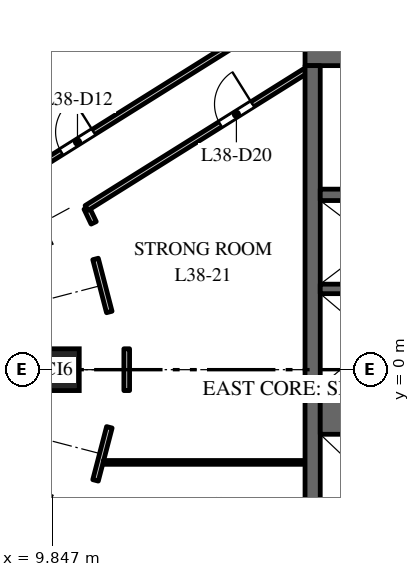
"""IFC4 building model, lengths in metres.
Left out: names, types, materials, properties, quantities, classifications, styles, units other than length and angle.
Written with IfcOpenShell. Run it as: python <this file> out.ifc"""

import sys

from ifc_helpers import new_model, si_unit, direction, frame, frame_2d, origin, origin_2d, place, context, subcontext, project, spatial, rectangle, extrude, element, fill, save


model = new_model("IFC4")
c1 = context("Model", 3, precision=1e-05, world=origin(), true_north=direction((0.0, 1.0)))
c2 = subcontext(c1, "Body", "Model", "MODEL_VIEW")
j1 = project(units=[si_unit("LENGTHUNIT", "METRE"), si_unit("PLANEANGLEUNIT", "RADIAN")], contexts=[c1])
p1 = place(None, origin())
s1 = spatial("IfcSite", under=j1, at=p1, CompositionType="ELEMENT")
p2 = place(p1, origin())
s2 = spatial("IfcBuilding", under=s1, at=p2, CompositionType="ELEMENT")
p3 = place(p2, frame((0.0, 0.0, 166.0)))
s3 = spatial("IfcBuildingStorey", under=s2, at=p3, CompositionType="ELEMENT", Elevation=166.0)
p4 = place(p3, frame((10.008, 0.0, 0.0), z_axis=(0.0, 0.0, 1.0), x_axis=(0.0, 1.0, 0.0)))
e1 = element("IfcColumn", 1, at=p4, inside=s3, PredefinedType="COLUMN", context=c2, shape_type="SweptSolid", body=[
    extrude(rectangle(XDim=1.1, YDim=1.1, at=origin_2d()), origin(), (0.0, 0.0, 1.0), 4.0),
])
p5 = place(p3, frame((16.5, 8.25, 0.0), z_axis=(0.0, 0.0, 1.0), x_axis=(1.0, 0.0, 0.0)))
e2 = element("IfcWall", 2, at=p5, inside=s3, PredefinedType="SHEAR", context=c2, shape_type="SweptSolid", body=[
    extrude(rectangle(XDim=15.0, YDim=0.5, at=frame_2d((7.5, 0.0))), origin(), (0.0, 0.0, 1.0), 3.7),
])
p6 = place(p5, frame((6.9, 0.0, 0.0)))
e3 = element("IfcOpeningElement", 3, at=p6, cuts=e2, PredefinedType="OPENING", context=c2, shape_type="SweptSolid", body=[
    extrude(rectangle(XDim=1.2, YDim=2.1, at=frame_2d((0.6, 1.05))), frame((0.0, 0.26, 0.0), z_axis=(0.0, -1.0, 0.0), x_axis=(1.0, 0.0, 0.0)), (0.0, 0.0, 1.0), 0.52),
])
p7 = place(p5, frame((12.275, 0.0, 0.0)))
e4 = element("IfcOpeningElement", 4, at=p7, cuts=e2, PredefinedType="OPENING", context=c2, shape_type="SweptSolid", body=[
    extrude(rectangle(XDim=0.9, YDim=2.1, at=frame_2d((0.45, 1.05))), frame((0.0, 0.26, 0.0), z_axis=(0.0, -1.0, 0.0), x_axis=(1.0, 0.0, 0.0)), (0.0, 0.0, 1.0), 0.52),
])
p8 = place(p3, frame((16.7, -8.0, 0.0), z_axis=(0.0, 0.0, 1.0), x_axis=(0.0, 1.0, 0.0)))
e5 = element("IfcWall", 5, at=p8, inside=s3, PredefinedType="SHEAR", context=c2, shape_type="SweptSolid", body=[
    extrude(rectangle(XDim=16.0, YDim=0.4, at=frame_2d((8.0, 0.0))), origin(), (0.0, 0.0, 1.0), 3.7),
])
p9 = place(p3, frame((16.9, -1.075, 0.0), z_axis=(0.0, 0.0, 1.0), x_axis=(1.0, 0.0, 0.0)))
e6 = element("IfcWall", 6, at=p9, inside=s3, PredefinedType="SHEAR", context=c2, shape_type="SweptSolid", body=[
    extrude(rectangle(XDim=2.9, YDim=1.25, at=frame_2d((1.45, 0.0))), origin(), (0.0, 0.0, 1.0), 3.7),
])
p10 = place(p3, frame((16.9, 2.125, 0.0), z_axis=(0.0, 0.0, 1.0), x_axis=(1.0, 0.0, 0.0)))
e7 = element("IfcWall", 7, at=p10, inside=s3, PredefinedType="SHEAR", context=c2, shape_type="SweptSolid", body=[
    extrude(rectangle(XDim=2.9, YDim=0.25, at=frame_2d((1.45, 0.0))), origin(), (0.0, 0.0, 1.0), 3.7),
])
p11 = place(p3, frame((16.9, 4.6, 0.0), z_axis=(0.0, 0.0, 1.0), x_axis=(1.0, 0.0, 0.0)))
e8 = element("IfcWall", 8, at=p11, inside=s3, PredefinedType="SHEAR", context=c2, shape_type="SweptSolid", body=[
    extrude(rectangle(XDim=6.18, YDim=0.3, at=frame_2d((3.09, 0.0))), origin(), (0.0, 0.0, 1.0), 3.7),
])
p12 = place(p11, frame((4.9, 0.0, 0.0)))
e9 = element("IfcOpeningElement", 9, at=p12, cuts=e8, PredefinedType="OPENING", context=c2, shape_type="SweptSolid", body=[
    extrude(rectangle(XDim=1.1, YDim=2.1, at=frame_2d((0.55, 1.05))), frame((0.0, 0.16, 0.0), z_axis=(0.0, -1.0, 0.0), x_axis=(1.0, 0.0, 0.0)), (0.0, 0.0, 1.0), 0.32),
])
p13 = place(p3, frame((9.679, 5.469, 0.0), z_axis=(0.0, 0.0, 1.0), x_axis=(0.847602682855, 0.530631408811, 0.0)))
e10 = element("IfcWall", 10, at=p13, inside=s3, PredefinedType="PARTITIONING", context=c2, shape_type="SweptSolid", body=[
    extrude(rectangle(XDim=6.383, YDim=0.15, at=frame_2d((3.191, 0.0))), origin(), (0.0, 0.0, 1.0), 3.7),
])
p14 = place(p13, frame((0.483, 0.0, 0.0)))
e11 = element("IfcOpeningElement", 11, at=p14, cuts=e10, PredefinedType="OPENING", context=c2, shape_type="SweptSolid", body=[
    extrude(rectangle(XDim=1.0, YDim=2.1, at=frame_2d((0.5, 1.05))), frame((0.0, 0.085, 0.0), z_axis=(0.0, -1.0, 0.0), x_axis=(1.0, 0.0, 0.0)), (0.0, 0.0, 1.0), 0.17),
])
p15 = place(p3, frame((10.752, 4.254, 0.0), z_axis=(0.0, 0.0, 1.0), x_axis=(0.429758433873, -0.90294390109, 0.0)))
e12 = element("IfcWall", 12, at=p15, inside=s3, PredefinedType="PARTITIONING", context=c2, shape_type="SweptSolid", body=[
    extrude(rectangle(XDim=0.433, YDim=0.15, at=frame_2d((0.216, 0.0))), origin(), (0.0, 0.0, 1.0), 3.7),
])
p16 = place(p3, frame((10.752, 4.254, 0.0), z_axis=(0.0, 0.0, 1.0), x_axis=(0.847690706888, 0.530490777917, 0.0)))
e13 = element("IfcWall", 13, at=p16, inside=s3, PredefinedType="PARTITIONING", context=c2, shape_type="SweptSolid", body=[
    extrude(rectangle(XDim=6.781, YDim=0.15, at=frame_2d((3.39, 0.0))), origin(), (0.0, 0.0, 1.0), 3.7),
])
p17 = place(p16, frame((4.15, 0.0, 0.0)))
e14 = element("IfcOpeningElement", 14, at=p17, cuts=e13, PredefinedType="OPENING", context=c2, shape_type="SweptSolid", body=[
    extrude(rectangle(XDim=1.0, YDim=2.1, at=frame_2d((0.5, 1.05))), frame((0.0, 0.085, 0.0), z_axis=(0.0, -1.0, 0.0), x_axis=(1.0, 0.0, 0.0)), (0.0, 0.0, 1.0), 0.17),
])
p18 = place(p3, frame((10.987, -2.913, 0.0), z_axis=(0.0, 0.0, 1.0), x_axis=(0.252153395539, 0.967687276509, 0.0)))
e15 = element("IfcWall", 15, at=p18, inside=s3, PredefinedType="PARTITIONING", context=c2, shape_type="SweptSolid", body=[
    extrude(rectangle(XDim=1.444, YDim=0.15, at=frame_2d((0.722, 0.0))), origin(), (0.0, 0.0, 1.0), 3.7),
])
p19 = place(p3, frame((10.987, 2.913, 0.0), z_axis=(0.0, 0.0, 1.0), x_axis=(0.251214938505, -0.967931327457, 0.0)))
e16 = element("IfcWall", 16, at=p19, inside=s3, PredefinedType="PARTITIONING", context=c2, shape_type="SweptSolid", body=[
    extrude(rectangle(XDim=1.441, YDim=0.15, at=frame_2d((0.721, 0.0))), origin(), (0.0, 0.0, 1.0), 3.7),
])
p20 = place(p3, frame((11.193, -2.44, 0.0), z_axis=(0.0, 0.0, 1.0), x_axis=(1.0, 0.0, 0.0)))
e17 = element("IfcWall", 17, at=p20, inside=s3, PredefinedType="PARTITIONING", context=c2, shape_type="SweptSolid", body=[
    extrude(rectangle(XDim=5.307, YDim=0.1, at=frame_2d((2.653, 0.0))), origin(), (0.0, 0.0, 1.0), 3.7),
])
p21 = place(p3, frame((11.808, -0.55, 0.0), z_axis=(0.0, 0.0, 1.0), x_axis=(0.0, 1.0, 0.0)))
e18 = element("IfcWall", 18, at=p21, inside=s3, PredefinedType="PARTITIONING", context=c2, shape_type="SweptSolid", body=[
    extrude(rectangle(XDim=1.1, YDim=0.15, at=frame_2d((0.55, 0.0))), origin(), (0.0, 0.0, 1.0), 3.7),
])
p22 = place(p14, origin())
e19 = element("IfcDoor", 19, at=p22, inside=s3, OperationType="SINGLE_SWING_RIGHT", PredefinedType="DOOR", context=c2, shape_type="SweptSolid", body=[
    extrude(rectangle(XDim=1.0, YDim=2.1, at=frame_2d((0.5, 1.05))), frame((0.0, 0.025, 0.0), z_axis=(0.0, -1.0, 0.0), x_axis=(1.0, 0.0, 0.0)), (0.0, 0.0, 1.0), 0.05),
])
fill(e11, e19)
p23 = place(p17, origin())
e20 = element("IfcDoor", 20, at=p23, inside=s3, OperationType="SINGLE_SWING_RIGHT", PredefinedType="DOOR", context=c2, shape_type="SweptSolid", body=[
    extrude(rectangle(XDim=1.0, YDim=2.1, at=frame_2d((0.5, 1.05))), frame((0.0, 0.025, 0.0), z_axis=(0.0, -1.0, 0.0), x_axis=(1.0, 0.0, 0.0)), (0.0, 0.0, 1.0), 0.05),
])
fill(e14, e20)
save(model, sys.argv[1])
